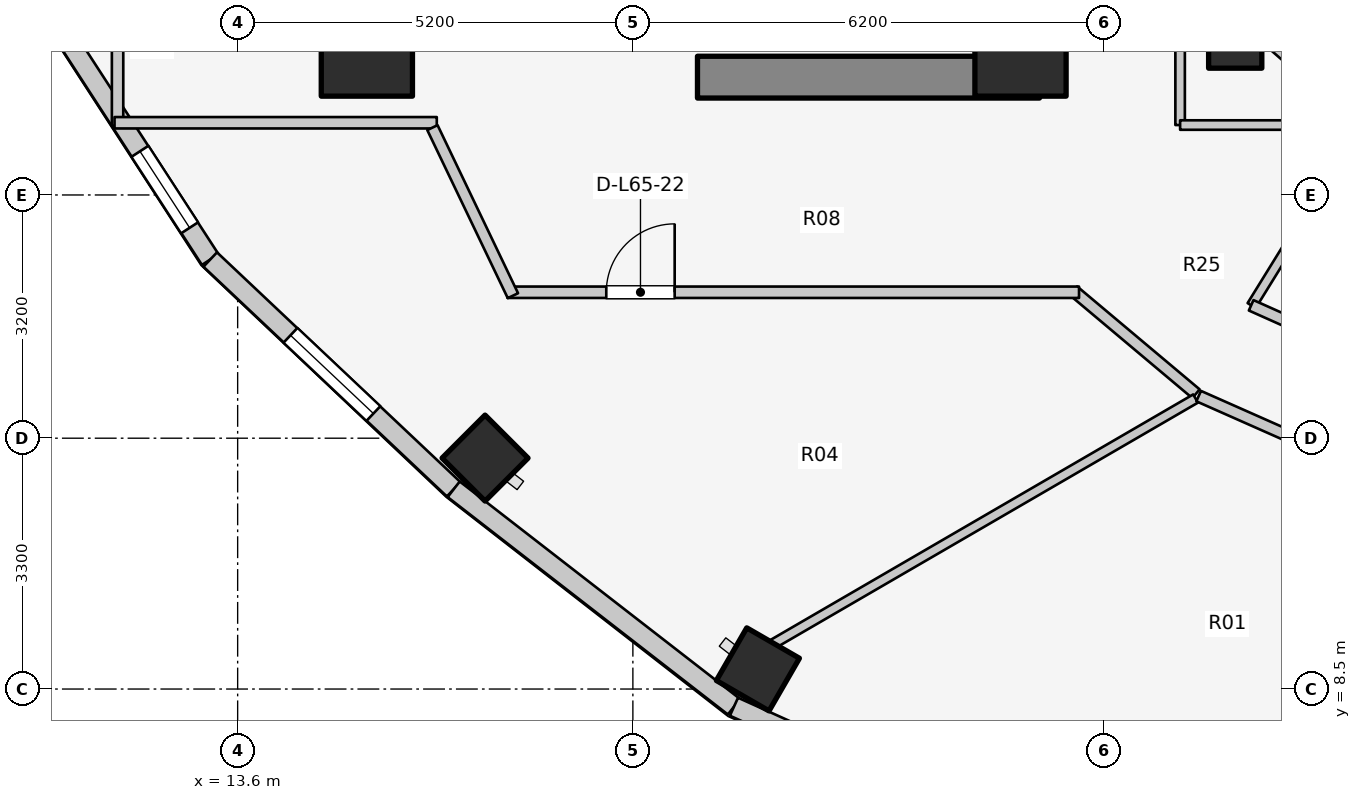
"""IFC4 building model, lengths in metres.
Left out: names, types, materials, properties, quantities, classifications, styles, units other than length and angle.
Written with IfcOpenShell. Run it as: python <this file> out.ifc"""

import sys

from ifc_helpers import new_model, si_unit, direction, frame, frame_2d, origin, origin_2d, place, context, subcontext, project, spatial, rectangle, extrude, element, fill, save


model = new_model("IFC4")
c1 = context("Model", 3, precision=1e-05, world=origin(), true_north=direction((0.0, 1.0)))
c2 = subcontext(c1, "Body", "Model", "MODEL_VIEW")
j1 = project(units=[si_unit("LENGTHUNIT", "METRE"), si_unit("PLANEANGLEUNIT", "RADIAN")], contexts=[c1])
p1 = place(None, origin())
s1 = spatial("IfcSite", under=j1, at=p1, CompositionType="ELEMENT")
p2 = place(p1, origin())
s2 = spatial("IfcBuilding", under=s1, at=p2, CompositionType="ELEMENT")
p3 = place(p2, frame((0.0, 0.0, 214.0)))
s3 = spatial("IfcBuildingStorey", under=s2, at=p3, CompositionType="ELEMENT", Elevation=214.0)
p4 = place(p3, frame((19.65, 16.55, 0.0), z_axis=(0.0, 0.0, 1.0), x_axis=(1.0, 0.0, 0.0)))
e1 = element("IfcWall", 1, at=p4, inside=s3, PredefinedType="SHEAR", context=c2, shape_type="SweptSolid", body=[
    extrude(rectangle(XDim=4.5, YDim=0.55, at=frame_2d((2.25, 0.0))), origin(), (0.0, 0.0, 1.0), 3.1),
])
for number, where, z_axis, x_axis in (
    (2, (15.3, 16.9, 0.0), (0.0, 0.0, 1.0), (1.0, 0.0, 0.0)),
    (3, (23.9, 16.9, 0.0), (0.0, 0.0, 1.0), (1.0, 0.0, 0.0)),
):
    element("IfcColumn", number, at=place(p3, frame(where, z_axis=z_axis, x_axis=x_axis)), inside=s3, PredefinedType="COLUMN", context=c2, shape_type="SweptSolid", body=[
        extrude(rectangle(XDim=1.2, YDim=1.2, at=origin_2d()), origin(), (0.0, 0.0, 1.0), 3.1),
    ])
p5 = place(p3, frame((26.725, 17.018, 0.0), z_axis=(0.0, 0.0, 1.0), x_axis=(1.0, 0.0, 0.0)))
e4 = element("IfcColumn", 4, at=p5, inside=s3, PredefinedType="COLUMN", context=c2, shape_type="SweptSolid", body=[
    extrude(rectangle(XDim=0.7, YDim=0.7, at=origin_2d()), origin(), (0.0, 0.0, 1.0), 3.1),
])
for number, where, z_axis, x_axis in (
    (5, (16.855, 11.538, 0.0), (0.0, 0.0, 1.0), (-0.707, -0.707, 0.0)),
    (6, (20.445, 8.759, 0.0), (0.0, 0.0, 1.0), (-0.5, -0.866, 0.0)),
):
    element("IfcColumn", number, at=place(p3, frame(where, z_axis=z_axis, x_axis=x_axis)), inside=s3, PredefinedType="COLUMN", context=c2, shape_type="SweptSolid", body=[
        extrude(rectangle(XDim=0.8, YDim=0.8, at=origin_2d()), origin(), (0.0, 0.0, 1.0), 3.1),
    ])
p6 = place(p3, frame((26.965, 17.258, 0.0), z_axis=(0.0, 0.0, 1.0), x_axis=(0.752576694707, -0.658504607869, 0.0)))
e7 = element("IfcWall", 7, at=p6, inside=s3, PredefinedType="STANDARD", context=c2, shape_type="SweptSolid", body=[
    extrude(rectangle(XDim=1.959, YDim=0.23, at=frame_2d((0.98, 0.0))), origin(), (0.0, 0.0, 1.0), 2.16),
])
p7 = place(p3, frame((10.895, 17.761, 0.0), z_axis=(0.0, 0.0, 1.0), x_axis=(0.544475908819, -0.838776480784, 0.0)))
e8 = element("IfcWall", 8, at=p7, inside=s3, PredefinedType="STANDARD", context=c2, shape_type="SweptSolid", body=[
    extrude(rectangle(XDim=4.305, YDim=0.26, at=frame_2d((2.152, 0.0))), origin(), (0.0, 0.0, 1.0), 2.85),
])
p8 = place(p7, frame((2.607, 0.0, 0.75)))
e9 = element("IfcOpeningElement", 9, at=p8, cuts=e8, PredefinedType="OPENING", context=c2, shape_type="SweptSolid", body=[
    extrude(rectangle(XDim=1.2, YDim=1.5, at=frame_2d((0.6, 0.75))), frame((0.0, 0.14, 0.0), z_axis=(0.0, -1.0, 0.0), x_axis=(1.0, 0.0, 0.0)), (0.0, 0.0, 1.0), 0.28),
])
p9 = place(p3, frame((13.239, 14.151, 0.0), z_axis=(0.0, 0.0, 1.0), x_axis=(0.72731899451, -0.686299555752, 0.0)))
e10 = element("IfcWall", 10, at=p9, inside=s3, PredefinedType="STANDARD", context=c2, shape_type="SweptSolid", body=[
    extrude(rectangle(XDim=4.404, YDim=0.26, at=frame_2d((2.202, 0.0))), origin(), (0.0, 0.0, 1.0), 2.85),
])
p10 = place(p9, frame((1.452, 0.0, 0.75)))
e11 = element("IfcOpeningElement", 11, at=p10, cuts=e10, PredefinedType="OPENING", context=c2, shape_type="SweptSolid", body=[
    extrude(rectangle(XDim=1.5, YDim=1.6, at=frame_2d((0.75, 0.8))), frame((0.0, 0.14, 0.0), z_axis=(0.0, -1.0, 0.0), x_axis=(1.0, 0.0, 0.0)), (0.0, 0.0, 1.0), 0.28),
])
p11 = place(p3, frame((16.442, 11.128, 0.0), z_axis=(0.0, 0.0, 1.0), x_axis=(0.790126214723, -0.612944177563, 0.0)))
e12 = element("IfcWall", 12, at=p11, inside=s3, PredefinedType="STANDARD", context=c2, shape_type="SweptSolid", body=[
    extrude(rectangle(XDim=4.667, YDim=0.26, at=frame_2d((2.333, 0.0))), origin(), (0.0, 0.0, 1.0), 2.85),
])
p12 = place(p3, frame((20.13, 8.267, 0.0), z_axis=(0.0, 0.0, 1.0), x_axis=(0.911427484938, -0.411460738952, 0.0)))
e13 = element("IfcWall", 13, at=p12, inside=s3, PredefinedType="STANDARD", context=c2, shape_type="SweptSolid", body=[
    extrude(rectangle(XDim=5.296, YDim=0.26, at=frame_2d((2.648, 0.0))), origin(), (0.0, 0.0, 1.0), 2.85),
])
p13 = place(p12, frame((1.448, 0.0, 0.75)))
e14 = element("IfcOpeningElement", 14, at=p13, cuts=e13, PredefinedType="OPENING", context=c2, shape_type="SweptSolid", body=[
    extrude(rectangle(XDim=2.4, YDim=1.7, at=frame_2d((1.2, 0.85))), frame((0.0, 0.14, 0.0), z_axis=(0.0, -1.0, 0.0), x_axis=(1.0, 0.0, 0.0)), (0.0, 0.0, 1.0), 0.28),
])
p14 = place(p3, frame((28.45, 15.985, 0.0), z_axis=(0.0, 0.0, 1.0), x_axis=(-0.52592395012, -0.850531597702, 0.0)))
e15 = element("IfcWall", 15, at=p14, inside=s3, PredefinedType="PARTITIONING", context=c2, shape_type="SweptSolid", body=[
    extrude(rectangle(XDim=2.869, YDim=0.125, at=frame_2d((1.435, 0.0))), origin(), (0.0, 0.0, 1.0), 2.376),
])
p15 = place(p3, frame((26.935, 13.549, 0.0), z_axis=(0.0, 0.0, 1.0), x_axis=(0.912859324183, -0.408274239027, 0.0)))
e16 = element("IfcWall", 16, at=p15, inside=s3, PredefinedType="PARTITIONING", context=c2, shape_type="SweptSolid", body=[
    extrude(rectangle(XDim=2.682, YDim=0.15, at=frame_2d((1.341, 0.0))), origin(), (0.0, 0.0, 1.0), 2.376),
])
p16 = place(p3, frame((26.0, 15.92, 0.0), z_axis=(0.0, 0.0, 1.0), x_axis=(0.0, 1.0, 0.0)))
e17 = element("IfcWall", 17, at=p16, inside=s3, PredefinedType="PARTITIONING", context=c2, shape_type="SweptSolid", body=[
    extrude(rectangle(XDim=4.28, YDim=0.125, at=frame_2d((2.14, 0.0))), origin(), (0.0, 0.0, 1.0), 2.232),
])
p17 = place(p3, frame((26.0, 15.92, 0.0), z_axis=(0.0, 0.0, 1.0), x_axis=(1.0, 0.0, 0.0)))
e18 = element("IfcWall", 18, at=p17, inside=s3, PredefinedType="PARTITIONING", context=c2, shape_type="SweptSolid", body=[
    extrude(rectangle(XDim=2.6, YDim=0.125, at=frame_2d((1.3, 0.0))), origin(), (0.0, 0.0, 1.0), 2.232),
])
p18 = place(p3, frame((12.02, 15.91, 0.0), z_axis=(0.0, 0.0, 1.0), x_axis=(0.0, 1.0, 0.0)))
e19 = element("IfcWall", 19, at=p18, inside=s3, PredefinedType="PARTITIONING", context=c2, shape_type="SweptSolid", body=[
    extrude(rectangle(XDim=2.93, YDim=0.15, at=frame_2d((1.465, 0.0))), origin(), (0.0, 0.0, 1.0), 2.855),
])
p19 = place(p3, frame((11.98, 15.95, 0.0), z_axis=(0.0, 0.0, 1.0), x_axis=(1.0, 0.0, 0.0)))
e20 = element("IfcWall", 20, at=p19, inside=s3, PredefinedType="PARTITIONING", context=c2, shape_type="SweptSolid", body=[
    extrude(rectangle(XDim=4.24, YDim=0.15, at=frame_2d((2.12, 0.0))), origin(), (0.0, 0.0, 1.0), 2.22),
])
p20 = place(p3, frame((26.209, 12.385, 0.0), z_axis=(0.0, 0.0, 1.0), x_axis=(-0.765677451641, 0.643224719711, 0.0)))
e21 = element("IfcWall", 21, at=p20, inside=s3, PredefinedType="PARTITIONING", context=c2, shape_type="SweptSolid", body=[
    extrude(rectangle(XDim=2.105, YDim=0.15, at=frame_2d((1.053, 0.0))), origin(), (0.0, 0.0, 1.0), 2.376),
])
p21 = place(p3, frame((17.15, 13.72, 0.0), z_axis=(0.0, 0.0, 1.0), x_axis=(1.0, 0.0, 0.0)))
e22 = element("IfcWall", 22, at=p21, inside=s3, PredefinedType="PARTITIONING", context=c2, shape_type="SweptSolid", body=[
    extrude(rectangle(XDim=7.52, YDim=0.15, at=frame_2d((3.76, 0.0))), origin(), (0.0, 0.0, 1.0), 2.376),
])
p22 = place(p21, frame((1.3, 0.0, 0.0)))
e23 = element("IfcOpeningElement", 23, at=p22, cuts=e22, PredefinedType="OPENING", context=c2, shape_type="SweptSolid", body=[
    extrude(rectangle(XDim=0.9, YDim=2.1, at=frame_2d((0.45, 1.05))), frame((0.0, 0.085, 0.0), z_axis=(0.0, -1.0, 0.0), x_axis=(1.0, 0.0, 0.0)), (0.0, 0.0, 1.0), 0.17),
])
p23 = place(p3, frame((17.222, 13.675, 0.0), z_axis=(0.0, 0.0, 1.0), x_axis=(-0.431973389813, 0.901886351207, 0.0)))
e24 = element("IfcWall", 24, at=p23, inside=s3, PredefinedType="PARTITIONING", context=c2, shape_type="SweptSolid", body=[
    extrude(rectangle(XDim=2.452, YDim=0.15, at=frame_2d((1.226, 0.0))), origin(), (0.0, 0.0, 1.0), 2.855),
])
p24 = place(p3, frame((26.203, 12.322, 0.0), z_axis=(0.0, 0.0, 1.0), x_axis=(-0.864712462127, -0.502267217567, 0.0)))
e25 = element("IfcWall", 25, at=p24, inside=s3, PredefinedType="PARTITIONING", context=c2, shape_type="SweptSolid", body=[
    extrude(rectangle(XDim=6.439, YDim=0.125, at=frame_2d((3.22, 0.0))), origin(), (0.0, 0.0, 1.0), 2.376),
])
p25 = place(p3, frame((26.244, 12.354, 0.0), z_axis=(0.0, 0.0, 1.0), x_axis=(0.914302802833, -0.405031337963, 0.0)))
e26 = element("IfcWall", 26, at=p25, inside=s3, PredefinedType="PARTITIONING", context=c2, shape_type="SweptSolid", body=[
    extrude(rectangle(XDim=3.049, YDim=0.15, at=frame_2d((1.525, 0.0))), origin(), (0.0, 0.0, 1.0), 2.376),
])
p26 = place(p8, origin())
e27 = element("IfcWindow", 27, at=p26, inside=s3, PartitioningType="SINGLE_PANEL", PredefinedType="WINDOW", context=c2, shape_type="SweptSolid", body=[
    extrude(rectangle(XDim=1.2, YDim=1.5, at=frame_2d((0.6, 0.75))), frame((0.0, 0.03, 0.0), z_axis=(0.0, -1.0, 0.0), x_axis=(1.0, 0.0, 0.0)), (0.0, 0.0, 1.0), 0.06),
])
fill(e9, e27)
p27 = place(p10, origin())
e28 = element("IfcWindow", 28, at=p27, inside=s3, PartitioningType="SINGLE_PANEL", PredefinedType="WINDOW", context=c2, shape_type="SweptSolid", body=[
    extrude(rectangle(XDim=1.5, YDim=1.6, at=frame_2d((0.75, 0.8))), frame((0.0, 0.03, 0.0), z_axis=(0.0, -1.0, 0.0), x_axis=(1.0, 0.0, 0.0)), (0.0, 0.0, 1.0), 0.06),
])
fill(e11, e28)
p28 = place(p22, origin())
e29 = element("IfcDoor", 29, at=p28, inside=s3, OperationType="SINGLE_SWING_RIGHT", PredefinedType="DOOR", context=c2, shape_type="SweptSolid", body=[
    extrude(rectangle(XDim=0.9, YDim=2.1, at=frame_2d((0.45, 1.05))), frame((0.0, 0.025, 0.0), z_axis=(0.0, -1.0, 0.0), x_axis=(1.0, 0.0, 0.0)), (0.0, 0.0, 1.0), 0.05),
])
fill(e23, e29)
save(model, sys.argv[1])
